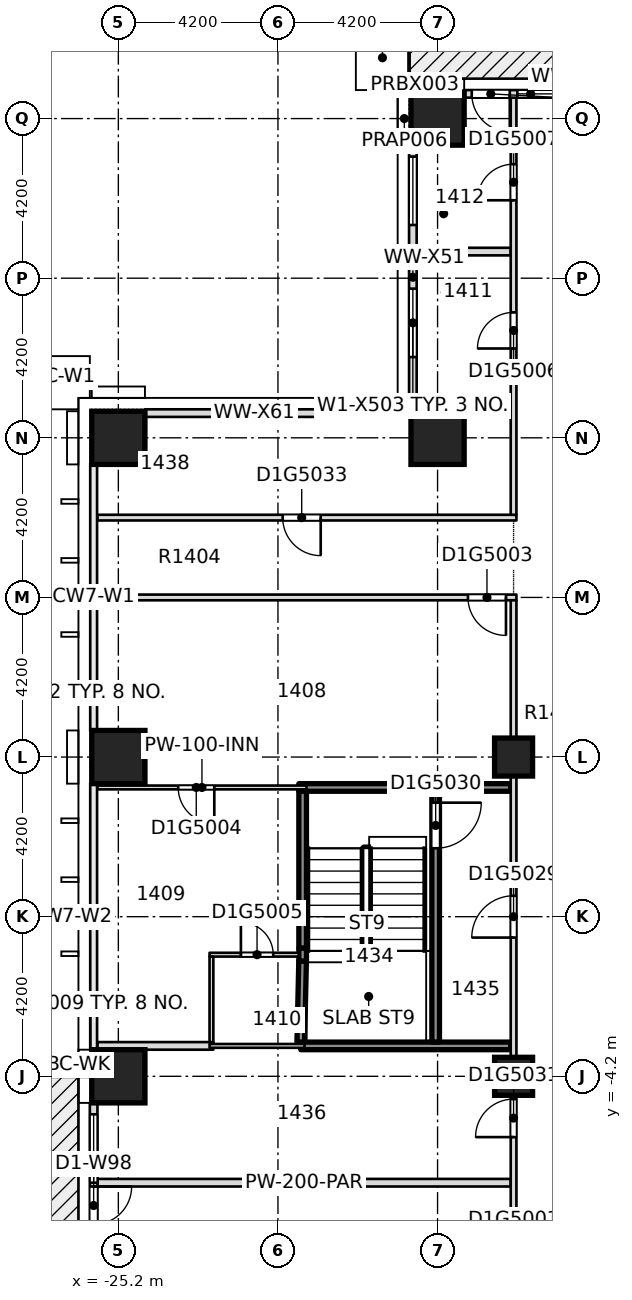
"""IFC4 building model, lengths in metres.
Left out: names, types, materials, properties, quantities, classifications, styles, units other than length and angle.
Written with IfcOpenShell. Run it as: python <this file> out.ifc"""

import sys

from ifc_helpers import new_model, si_unit, direction, frame, frame_2d, origin, origin_2d, place, context, subcontext, project, spatial, rectangle, extrude, element, fill, save


model = new_model("IFC4")
c1 = context("Model", 3, precision=1e-05, world=origin(), true_north=direction((0.0, 1.0)))
c2 = subcontext(c1, "Body", "Model", "MODEL_VIEW")
j1 = project(units=[si_unit("LENGTHUNIT", "METRE"), si_unit("PLANEANGLEUNIT", "RADIAN")], contexts=[c1])
p1 = place(None, origin())
s1 = spatial("IfcSite", under=j1, at=p1, CompositionType="ELEMENT")
p2 = place(p1, origin())
s2 = spatial("IfcBuilding", under=s1, at=p2, CompositionType="ELEMENT")
p3 = place(p2, frame((0.0, 0.0, 62.1)))
s3 = spatial("IfcBuildingStorey", under=s2, at=p3, CompositionType="ELEMENT", Elevation=62.1)
for number, where, z_axis, x_axis in (
    (1, (-25.2, -4.2, -0.32), (0.0, 0.0, 1.0), (1.0, 0.0, 0.0)),
    (2, (-25.2, 4.2, -0.32), (0.0, 0.0, 1.0), (1.0, 0.0, 0.0)),
    (3, (-25.2, 12.6, -0.32), (0.0, 0.0, 1.0), (1.0, 0.0, 0.0)),
    (4, (-16.8, 12.6, -0.32), (0.0, 0.0, 1.0), (1.0, 0.0, 0.0)),
    (5, (-16.8, 21.0, -0.32), (0.0, 0.0, 1.0), (1.0, 0.0, 0.0)),
):
    element("IfcColumn", number, at=place(p3, frame(where, z_axis=z_axis, x_axis=x_axis)), inside=s3, PredefinedType="COLUMN", context=c2, shape_type="SweptSolid", body=[
        extrude(rectangle(XDim=1.4, YDim=1.4, at=origin_2d()), origin(), (0.0, 0.0, 1.0), 3.45),
    ])
for number, where, z_axis, x_axis in (
    (6, (-14.8, -4.2, -0.32), (0.0, 0.0, 1.0), (1.0, 0.0, 0.0)),
    (7, (-14.8, 4.2, -0.32), (0.0, 0.0, 1.0), (1.0, 0.0, 0.0)),
):
    element("IfcColumn", number, at=place(p3, frame(where, z_axis=z_axis, x_axis=x_axis)), inside=s3, PredefinedType="COLUMN", context=c2, shape_type="SweptSolid", body=[
        extrude(rectangle(XDim=1.0, YDim=1.0, at=origin_2d()), origin(), (0.0, 0.0, 1.0), 3.45),
    ])
p4 = place(p3, frame((-25.75, -7.0, 0.0), z_axis=(0.0, 0.0, 1.0), x_axis=(1.0, 0.0, 0.0)))
e8 = element("IfcWall", 8, at=p4, inside=s3, PredefinedType="PARTITIONING", context=c2, shape_type="SweptSolid", body=[
    extrude(rectangle(XDim=10.875, YDim=0.2, at=frame_2d((5.438, 0.0))), origin(), (0.0, 0.0, 1.0), 3.13),
])
p5 = place(p3, frame((-25.75, -3.4, 0.0), z_axis=(0.0, 0.0, 1.0), x_axis=(1.0, 0.0, 0.0)))
e9 = element("IfcWall", 9, at=p5, inside=s3, PredefinedType="PARTITIONING", context=c2, shape_type="SweptSolid", body=[
    extrude(rectangle(XDim=3.05, YDim=0.2, at=frame_2d((1.525, 0.0))), origin(), (0.0, 0.0, 1.0), 3.13),
])
p6 = place(p3, frame((-22.8, -3.4, 0.0), z_axis=(0.0, 0.0, 1.0), x_axis=(1.0, 0.0, 0.0)))
e10 = element("IfcWall", 10, at=p6, inside=s3, PredefinedType="PARTITIONING", context=c2, shape_type="SweptSolid", body=[
    extrude(rectangle(XDim=2.5, YDim=0.1, at=frame_2d((1.25, 0.0))), origin(), (0.0, 0.0, 1.0), 3.13),
])
p7 = place(p3, frame((-20.4, -3.4, 0.0), z_axis=(0.0, 0.0, 1.0), x_axis=(1.0, 0.0, 0.0)))
e11 = element("IfcWall", 11, at=p7, inside=s3, PredefinedType="SOLIDWALL", context=c2, shape_type="SweptSolid", body=[
    extrude(rectangle(XDim=5.525, YDim=0.2, at=frame_2d((2.762, 0.0))), origin(), (0.0, 0.0, 1.0), 3.13),
])
p8 = place(p3, frame((-22.8, -1.0, 0.0), z_axis=(0.0, 0.0, 1.0), x_axis=(1.0, 0.0, 0.0)))
e12 = element("IfcWall", 12, at=p8, inside=s3, PredefinedType="PARTITIONING", context=c2, shape_type="SweptSolid", body=[
    extrude(rectangle(XDim=2.35, YDim=0.1, at=frame_2d((1.175, 0.0))), origin(), (0.0, 0.0, 1.0), 3.13),
])
p9 = place(p8, frame((0.825, 0.0, 0.0)))
e13 = element("IfcOpeningElement", 13, at=p9, cuts=e12, PredefinedType="OPENING", context=c2, shape_type="SweptSolid", body=[
    extrude(rectangle(XDim=0.85, YDim=2.1, at=frame_2d((0.425, 1.05))), frame((0.0, 0.06, 0.0), z_axis=(0.0, -1.0, 0.0), x_axis=(1.0, 0.0, 0.0)), (0.0, 0.0, 1.0), 0.12),
])
p10 = place(p3, frame((-25.75, 3.4, 0.0), z_axis=(0.0, 0.0, 1.0), x_axis=(1.0, 0.0, 0.0)))
e14 = element("IfcWall", 14, at=p10, inside=s3, PredefinedType="PARTITIONING", context=c2, shape_type="SweptSolid", body=[
    extrude(rectangle(XDim=5.5, YDim=0.1, at=frame_2d((2.75, 0.0))), origin(), (0.0, 0.0, 1.0), 3.13),
])
p11 = place(p10, frame((2.125, 0.0, 0.0)))
e15 = element("IfcOpeningElement", 15, at=p11, cuts=e14, PredefinedType="OPENING", context=c2, shape_type="SweptSolid", body=[
    extrude(rectangle(XDim=0.95, YDim=2.1, at=frame_2d((0.475, 1.05))), frame((0.0, 0.06, 0.0), z_axis=(0.0, -1.0, 0.0), x_axis=(1.0, 0.0, 0.0)), (0.0, 0.0, 1.0), 0.12),
])
p12 = place(p3, frame((-20.45, 3.4, 0.0), z_axis=(0.0, 0.0, 1.0), x_axis=(1.0, 0.0, 0.0)))
e16 = element("IfcWall", 16, at=p12, inside=s3, PredefinedType="SOLIDWALL", context=c2, shape_type="SweptSolid", body=[
    extrude(rectangle(XDim=5.575, YDim=0.2, at=frame_2d((2.788, 0.0))), origin(), (0.0, 0.0, 1.0), 3.13),
])
p13 = place(p3, frame((-25.75, 8.4, 0.0), z_axis=(0.0, 0.0, 1.0), x_axis=(1.0, 0.0, 0.0)))
e17 = element("IfcWall", 17, at=p13, inside=s3, PredefinedType="PARTITIONING", context=c2, shape_type="SweptSolid", body=[
    extrude(rectangle(XDim=11.025, YDim=0.15, at=frame_2d((5.512, 0.0))), origin(), (0.0, 0.0, 1.0), 3.13),
])
p14 = place(p13, frame((9.75, 0.0, 0.0)))
e18 = element("IfcOpeningElement", 18, at=p14, cuts=e17, PredefinedType="OPENING", context=c2, shape_type="SweptSolid", body=[
    extrude(rectangle(XDim=1.0, YDim=2.1, at=frame_2d((0.5, 1.05))), frame((0.0, 0.085, 0.0), z_axis=(0.0, -1.0, 0.0), x_axis=(1.0, 0.0, 0.0)), (0.0, 0.0, 1.0), 0.17),
])
p15 = place(p3, frame((-25.75, 10.5, 0.0), z_axis=(0.0, 0.0, 1.0), x_axis=(1.0, 0.0, 0.0)))
e19 = element("IfcWall", 19, at=p15, inside=s3, PredefinedType="PARTITIONING", context=c2, shape_type="SweptSolid", body=[
    extrude(rectangle(XDim=11.025, YDim=0.15, at=frame_2d((5.512, 0.0))), origin(), (0.0, 0.0, 1.0), 3.13),
])
p16 = place(p15, frame((4.875, 0.0, 0.0)))
e20 = element("IfcOpeningElement", 20, at=p16, cuts=e19, PredefinedType="OPENING", context=c2, shape_type="SweptSolid", body=[
    extrude(rectangle(XDim=1.0, YDim=2.1, at=frame_2d((0.5, 1.05))), frame((0.0, 0.085, 0.0), z_axis=(0.0, -1.0, 0.0), x_axis=(1.0, 0.0, 0.0)), (0.0, 0.0, 1.0), 0.17),
])
for number, where, z_axis, x_axis in (
    (21, (-17.35, 13.35, 0.0), (0.0, 0.0, 1.0), (1.0, 0.0, 0.0)),
    (22, (-17.35, 17.5, 0.0), (0.0, 0.0, 1.0), (1.0, 0.0, 0.0)),
):
    element("IfcWall", number, at=place(p3, frame(where, z_axis=z_axis, x_axis=x_axis)), inside=s3, PredefinedType="PARTITIONING", context=c2, shape_type="SweptSolid", body=[
        extrude(rectangle(XDim=2.475, YDim=0.2, at=frame_2d((1.238, 0.0))), origin(), (0.0, 0.0, 1.0), 3.13),
    ])
p17 = place(p3, frame((-22.75, -3.3, 0.0), z_axis=(0.0, 0.0, 1.0), x_axis=(0.0, 1.0, 0.0)))
e23 = element("IfcWall", 23, at=p17, inside=s3, PredefinedType="PARTITIONING", context=c2, shape_type="SweptSolid", body=[
    extrude(rectangle(XDim=2.25, YDim=0.1, at=frame_2d((1.125, 0.0))), origin(), (0.0, 0.0, 1.0), 3.13),
])
p18 = place(p3, frame((-20.4, -3.3, 0.0), z_axis=(0.0, 0.0, 1.0), x_axis=(0.022687568549, 0.99974260399, 0.0)))
e24 = element("IfcWall", 24, at=p18, inside=s3, PredefinedType="SOLIDWALL", context=c2, shape_type="SweptSolid", body=[
    extrude(rectangle(XDim=2.131, YDim=0.2, at=frame_2d((1.065, 0.0))), origin(), (0.0, 0.0, 1.0), 3.13),
])
p19 = place(p3, frame((-20.35, -0.83, 0.0), z_axis=(0.0, 0.0, 1.0), x_axis=(0.0, 1.0, 0.0)))
e25 = element("IfcWall", 25, at=p19, inside=s3, PredefinedType="SOLIDWALL", context=c2, shape_type="SweptSolid", body=[
    extrude(rectangle(XDim=4.13, YDim=0.2, at=frame_2d((2.065, 0.0))), origin(), (0.0, 0.0, 1.0), 3.13),
])
p20 = place(p3, frame((-16.85, -3.3, 0.0), z_axis=(0.0, 0.0, 1.0), x_axis=(0.0, 1.0, 0.0)))
e26 = element("IfcWall", 26, at=p20, inside=s3, PredefinedType="SOLIDWALL", context=c2, shape_type="SweptSolid", body=[
    extrude(rectangle(XDim=6.6, YDim=0.2, at=frame_2d((3.3, 0.0))), origin(), (0.0, 0.0, 1.0), 3.13),
])
p21 = place(p20, frame((5.1, 0.0, 0.0)))
e27 = element("IfcOpeningElement", 27, at=p21, cuts=e26, PredefinedType="OPENING", context=c2, shape_type="SweptSolid", body=[
    extrude(rectangle(XDim=1.2, YDim=2.1, at=frame_2d((0.6, 1.05))), frame((0.0, 0.11, 0.0), z_axis=(0.0, -1.0, 0.0), x_axis=(1.0, 0.0, 0.0)), (0.0, 0.0, 1.0), 0.22),
])
p22 = place(p3, frame((-14.8, -9.85, 0.0), z_axis=(0.0, 0.0, 1.0), x_axis=(0.0, 1.0, 0.0)))
e28 = element("IfcWall", 28, at=p22, inside=s3, PredefinedType="PARTITIONING", context=c2, shape_type="SweptSolid", body=[
    extrude(rectangle(XDim=18.175, YDim=0.15, at=frame_2d((9.087, 0.0))), origin(), (0.0, 0.0, 1.0), 3.13),
])
p23 = place(p22, frame((0.3, 0.0, 0.0)))
e29 = element("IfcOpeningElement", 29, at=p23, cuts=e28, PredefinedType="OPENING", context=c2, shape_type="SweptSolid", body=[
    extrude(rectangle(XDim=0.95, YDim=2.1, at=frame_2d((0.475, 1.05))), frame((0.0, 0.085, 0.0), z_axis=(0.0, -1.0, 0.0), x_axis=(1.0, 0.0, 0.0)), (0.0, 0.0, 1.0), 0.17),
])
p24 = place(p22, frame((9.3, 0.0, 0.0)))
e30 = element("IfcOpeningElement", 30, at=p24, cuts=e28, PredefinedType="OPENING", context=c2, shape_type="SweptSolid", body=[
    extrude(rectangle(XDim=1.1, YDim=2.1, at=frame_2d((0.55, 1.05))), frame((0.0, 0.085, 0.0), z_axis=(0.0, -1.0, 0.0), x_axis=(1.0, 0.0, 0.0)), (0.0, 0.0, 1.0), 0.17),
])
p25 = place(p22, frame((4.05, 0.0, 0.0)))
e31 = element("IfcOpeningElement", 31, at=p25, cuts=e28, PredefinedType="OPENING", context=c2, shape_type="SweptSolid", body=[
    extrude(rectangle(XDim=1.0, YDim=2.1, at=frame_2d((0.5, 1.05))), frame((0.0, 0.085, 0.0), z_axis=(0.0, -1.0, 0.0), x_axis=(1.0, 0.0, 0.0)), (0.0, 0.0, 1.0), 0.17),
])
p26 = place(p3, frame((-14.8, 10.575, 0.0), z_axis=(0.0, 0.0, 1.0), x_axis=(0.0, 1.0, 0.0)))
e32 = element("IfcWall", 32, at=p26, inside=s3, PredefinedType="PARTITIONING", context=c2, shape_type="SweptSolid", body=[
    extrude(rectangle(XDim=10.975, YDim=0.15, at=frame_2d((5.488, 0.0))), origin(), (0.0, 0.0, 1.0), 3.13),
])
p27 = place(p26, frame((4.375, 0.0, 0.0)))
e33 = element("IfcOpeningElement", 33, at=p27, cuts=e32, PredefinedType="OPENING", context=c2, shape_type="SweptSolid", body=[
    extrude(rectangle(XDim=0.95, YDim=2.1, at=frame_2d((0.475, 1.05))), frame((0.0, 0.085, 0.0), z_axis=(0.0, -1.0, 0.0), x_axis=(1.0, 0.0, 0.0)), (0.0, 0.0, 1.0), 0.17),
])
p28 = place(p26, frame((8.275, 0.0, 0.0)))
e34 = element("IfcOpeningElement", 34, at=p28, cuts=e32, PredefinedType="OPENING", context=c2, shape_type="SweptSolid", body=[
    extrude(rectangle(XDim=0.95, YDim=2.1, at=frame_2d((0.475, 1.05))), frame((0.0, 0.085, 0.0), z_axis=(0.0, -1.0, 0.0), x_axis=(1.0, 0.0, 0.0)), (0.0, 0.0, 1.0), 0.17),
])
p29 = place(p3, frame((-12.6, 21.65, 0.0), z_axis=(0.0, 0.0, 1.0), x_axis=(-1.0, 0.0, 0.0)))
e35 = element("IfcWall", 35, at=p29, inside=s3, PredefinedType="STANDARD", context=c2, shape_type="SweptSolid", body=[
    extrude(rectangle(XDim=3.5, YDim=0.2, at=frame_2d((1.75, 0.0))), origin(), (0.0, 0.0, 1.0), 3.13),
])
p30 = place(p29, frame((0.3, 0.0, 0.2)))
e36 = element("IfcOpeningElement", 36, at=p30, cuts=e35, PredefinedType="OPENING", context=c2, shape_type="SweptSolid", body=[
    extrude(rectangle(XDim=1.8, YDim=2.65, at=frame_2d((0.9, 1.325))), frame((0.0, 0.11, 0.0), z_axis=(0.0, -1.0, 0.0), x_axis=(1.0, 0.0, 0.0)), (0.0, 0.0, 1.0), 0.22),
])
p31 = place(p29, frame((2.3, 0.0, 0.0)))
e37 = element("IfcOpeningElement", 37, at=p31, cuts=e35, PredefinedType="OPENING", context=c2, shape_type="SweptSolid", body=[
    extrude(rectangle(XDim=1.0, YDim=2.4, at=frame_2d((0.5, 1.2))), frame((0.0, 0.11, 0.0), z_axis=(0.0, -1.0, 0.0), x_axis=(1.0, 0.0, 0.0)), (0.0, 0.0, 1.0), 0.22),
])
p32 = place(p3, frame((-17.45, 20.3, 0.0), z_axis=(0.0, 0.0, 1.0), x_axis=(0.0, -1.0, 0.0)))
e38 = element("IfcWall", 38, at=p32, inside=s3, PredefinedType="STANDARD", context=c2, shape_type="SweptSolid", body=[
    extrude(rectangle(XDim=6.95, YDim=0.2, at=frame_2d((3.475, 0.0))), origin(), (0.0, 0.0, 1.0), 3.13),
])
p33 = place(p32, frame((3.775, 0.0, 0.2)))
e39 = element("IfcOpeningElement", 39, at=p33, cuts=e38, PredefinedType="OPENING", context=c2, shape_type="SweptSolid", body=[
    extrude(rectangle(XDim=1.8, YDim=2.65, at=frame_2d((0.9, 1.325))), frame((0.0, 0.11, 0.0), z_axis=(0.0, -1.0, 0.0), x_axis=(1.0, 0.0, 0.0)), (0.0, 0.0, 1.0), 0.22),
])
p34 = place(p32, frame((0.3, 0.0, 0.2)))
e40 = element("IfcOpeningElement", 40, at=p34, cuts=e38, PredefinedType="OPENING", context=c2, shape_type="SweptSolid", body=[
    extrude(rectangle(XDim=1.8, YDim=2.65, at=frame_2d((0.9, 1.325))), frame((0.0, 0.11, 0.0), z_axis=(0.0, -1.0, 0.0), x_axis=(1.0, 0.0, 0.0)), (0.0, 0.0, 1.0), 0.22),
])
p35 = place(p3, frame((-17.55, 13.25, 0.0), z_axis=(0.0, 0.0, 1.0), x_axis=(-1.0, 0.0, 0.0)))
e41 = element("IfcWall", 41, at=p35, inside=s3, PredefinedType="STANDARD", context=c2, shape_type="SweptSolid", body=[
    extrude(rectangle(XDim=6.95, YDim=0.2, at=frame_2d((3.475, 0.0))), origin(), (0.0, 0.0, 1.0), 3.13),
])
p36 = place(p3, frame((-25.85, -4.9, 0.0), z_axis=(0.0, 0.0, 1.0), x_axis=(0.0, -1.0, 0.0)))
e42 = element("IfcWall", 42, at=p36, inside=s3, PredefinedType="STANDARD", context=c2, shape_type="SweptSolid", body=[
    extrude(rectangle(XDim=7.0, YDim=0.2, at=frame_2d((3.5, 0.0))), origin(), (0.0, 0.0, 1.0), 3.13),
])
p37 = place(p36, frame((3.8, 0.0, 0.2)))
e43 = element("IfcOpeningElement", 43, at=p37, cuts=e42, PredefinedType="OPENING", context=c2, shape_type="SweptSolid", body=[
    extrude(rectangle(XDim=1.8, YDim=2.65, at=frame_2d((0.9, 1.325))), frame((0.0, 0.11, 0.0), z_axis=(0.0, -1.0, 0.0), x_axis=(1.0, 0.0, 0.0)), (0.0, 0.0, 1.0), 0.22),
])
p38 = place(p36, frame((5.7, 0.0, 0.0)))
e44 = element("IfcOpeningElement", 44, at=p38, cuts=e42, PredefinedType="OPENING", context=c2, shape_type="SweptSolid", body=[
    extrude(rectangle(XDim=1.0, YDim=2.4, at=frame_2d((0.5, 1.2))), frame((0.0, 0.11, 0.0), z_axis=(0.0, -1.0, 0.0), x_axis=(1.0, 0.0, 0.0)), (0.0, 0.0, 1.0), 0.22),
])
p39 = place(p36, frame((0.3, 0.0, 0.2)))
e45 = element("IfcOpeningElement", 45, at=p39, cuts=e42, PredefinedType="OPENING", context=c2, shape_type="SweptSolid", body=[
    extrude(rectangle(XDim=1.8, YDim=2.65, at=frame_2d((0.9, 1.325))), frame((0.0, 0.11, 0.0), z_axis=(0.0, -1.0, 0.0), x_axis=(1.0, 0.0, 0.0)), (0.0, 0.0, 1.0), 0.22),
])
p40 = place(p36, frame((2.2, 0.0, 0.0)))
e46 = element("IfcOpeningElement", 46, at=p40, cuts=e42, PredefinedType="OPENING", context=c2, shape_type="SweptSolid", body=[
    extrude(rectangle(XDim=1.0, YDim=2.4, at=frame_2d((0.5, 1.2))), frame((0.0, 0.11, 0.0), z_axis=(0.0, -1.0, 0.0), x_axis=(1.0, 0.0, 0.0)), (0.0, 0.0, 1.0), 0.22),
])
p41 = place(p3, frame((-20.35, -1.17, 0.0), z_axis=(0.0, 0.0, 1.0), x_axis=(0.0, 1.0, 0.0)))
e47 = element("IfcWall", 47, at=p41, inside=s3, PredefinedType="SOLIDWALL", context=c2, shape_type="SweptSolid", body=[
    extrude(rectangle(XDim=0.34, YDim=0.2, at=frame_2d((0.17, 0.0))), origin(), (0.0, 0.0, 1.0), 3.13),
])
p42 = place(p14, origin())
e48 = element("IfcDoor", 48, at=p42, inside=s3, OperationType="SINGLE_SWING_RIGHT", PredefinedType="DOOR", context=c2, shape_type="SweptSolid", body=[
    extrude(rectangle(XDim=1.0, YDim=2.1, at=frame_2d((0.5, 1.05))), frame((0.0, 0.025, 0.0), z_axis=(0.0, -1.0, 0.0), x_axis=(1.0, 0.0, 0.0)), (0.0, 0.0, 1.0), 0.05),
])
fill(e18, e48)
p43 = place(p11, origin())
e49 = element("IfcDoor", 49, at=p43, inside=s3, OperationType="SINGLE_SWING_LEFT", PredefinedType="DOOR", context=c2, shape_type="SweptSolid", body=[
    extrude(rectangle(XDim=0.95, YDim=2.1, at=frame_2d((0.475, 1.05))), frame((0.0, 0.025, 0.0), z_axis=(0.0, -1.0, 0.0), x_axis=(1.0, 0.0, 0.0)), (0.0, 0.0, 1.0), 0.05),
])
fill(e15, e49)
p44 = place(p9, origin())
e50 = element("IfcDoor", 50, at=p44, inside=s3, OperationType="SINGLE_SWING_RIGHT", PredefinedType="DOOR", context=c2, shape_type="SweptSolid", body=[
    extrude(rectangle(XDim=0.85, YDim=2.1, at=frame_2d((0.425, 1.05))), frame((0.0, 0.025, 0.0), z_axis=(0.0, -1.0, 0.0), x_axis=(1.0, 0.0, 0.0)), (0.0, 0.0, 1.0), 0.05),
])
fill(e13, e50)
p45 = place(p27, origin())
e51 = element("IfcDoor", 51, at=p45, inside=s3, OperationType="SINGLE_SWING_LEFT", PredefinedType="DOOR", context=c2, shape_type="SweptSolid", body=[
    extrude(rectangle(XDim=0.95, YDim=2.1, at=frame_2d((0.475, 1.05))), frame((0.0, 0.025, 0.0), z_axis=(0.0, -1.0, 0.0), x_axis=(1.0, 0.0, 0.0)), (0.0, 0.0, 1.0), 0.05),
])
fill(e33, e51)
p46 = place(p28, origin())
e52 = element("IfcDoor", 52, at=p46, inside=s3, OperationType="SINGLE_SWING_RIGHT", PredefinedType="DOOR", context=c2, shape_type="SweptSolid", body=[
    extrude(rectangle(XDim=0.95, YDim=2.1, at=frame_2d((0.475, 1.05))), frame((0.0, 0.025, 0.0), z_axis=(0.0, -1.0, 0.0), x_axis=(1.0, 0.0, 0.0)), (0.0, 0.0, 1.0), 0.05),
])
fill(e34, e52)
p47 = place(p24, origin())
e53 = element("IfcDoor", 53, at=p47, inside=s3, OperationType="SINGLE_SWING_RIGHT", PredefinedType="DOOR", context=c2, shape_type="SweptSolid", body=[
    extrude(rectangle(XDim=1.1, YDim=2.1, at=frame_2d((0.55, 1.05))), frame((0.0, 0.025, 0.0), z_axis=(0.0, -1.0, 0.0), x_axis=(1.0, 0.0, 0.0)), (0.0, 0.0, 1.0), 0.05),
])
fill(e30, e53)
p48 = place(p21, origin())
e54 = element("IfcDoor", 54, at=p48, inside=s3, OperationType="SINGLE_SWING_RIGHT", PredefinedType="DOOR", context=c2, shape_type="SweptSolid", body=[
    extrude(rectangle(XDim=1.2, YDim=2.1, at=frame_2d((0.6, 1.05))), frame((0.0, 0.025, 0.0), z_axis=(0.0, -1.0, 0.0), x_axis=(1.0, 0.0, 0.0)), (0.0, 0.0, 1.0), 0.05),
])
fill(e27, e54)
p49 = place(p25, origin())
e55 = element("IfcDoor", 55, at=p49, inside=s3, OperationType="SINGLE_SWING_LEFT", PredefinedType="DOOR", context=c2, shape_type="SweptSolid", body=[
    extrude(rectangle(XDim=1.0, YDim=2.1, at=frame_2d((0.5, 1.05))), frame((0.0, 0.025, 0.0), z_axis=(0.0, -1.0, 0.0), x_axis=(1.0, 0.0, 0.0)), (0.0, 0.0, 1.0), 0.05),
])
fill(e31, e55)
p50 = place(p16, origin())
e56 = element("IfcDoor", 56, at=p50, inside=s3, OperationType="SINGLE_SWING_RIGHT", PredefinedType="DOOR", context=c2, shape_type="SweptSolid", body=[
    extrude(rectangle(XDim=1.0, YDim=2.1, at=frame_2d((0.5, 1.05))), frame((0.0, 0.025, 0.0), z_axis=(0.0, -1.0, 0.0), x_axis=(1.0, 0.0, 0.0)), (0.0, 0.0, 1.0), 0.05),
])
fill(e20, e56)
p51 = place(p30, origin())
e57 = element("IfcWindow", 57, at=p51, inside=s3, PartitioningType="SINGLE_PANEL", PredefinedType="WINDOW", context=c2, shape_type="SweptSolid", body=[
    extrude(rectangle(XDim=1.8, YDim=2.65, at=frame_2d((0.9, 1.325))), frame((0.0, 0.03, 0.0), z_axis=(0.0, -1.0, 0.0), x_axis=(1.0, 0.0, 0.0)), (0.0, 0.0, 1.0), 0.06),
])
fill(e36, e57)
p52 = place(p31, origin())
e58 = element("IfcDoor", 58, at=p52, inside=s3, OperationType="SINGLE_SWING_LEFT", PredefinedType="DOOR", context=c2, shape_type="SweptSolid", body=[
    extrude(rectangle(XDim=1.0, YDim=2.4, at=frame_2d((0.5, 1.2))), frame((0.0, 0.025, 0.0), z_axis=(0.0, -1.0, 0.0), x_axis=(1.0, 0.0, 0.0)), (0.0, 0.0, 1.0), 0.05),
])
fill(e37, e58)
p53 = place(p33, origin())
e59 = element("IfcWindow", 59, at=p53, inside=s3, PartitioningType="SINGLE_PANEL", PredefinedType="WINDOW", context=c2, shape_type="SweptSolid", body=[
    extrude(rectangle(XDim=1.8, YDim=2.65, at=frame_2d((0.9, 1.325))), frame((0.0, 0.03, 0.0), z_axis=(0.0, -1.0, 0.0), x_axis=(1.0, 0.0, 0.0)), (0.0, 0.0, 1.0), 0.06),
])
fill(e39, e59)
p54 = place(p34, origin())
e60 = element("IfcWindow", 60, at=p54, inside=s3, PartitioningType="SINGLE_PANEL", PredefinedType="WINDOW", context=c2, shape_type="SweptSolid", body=[
    extrude(rectangle(XDim=1.8, YDim=2.65, at=frame_2d((0.9, 1.325))), frame((0.0, 0.03, 0.0), z_axis=(0.0, -1.0, 0.0), x_axis=(1.0, 0.0, 0.0)), (0.0, 0.0, 1.0), 0.06),
])
fill(e40, e60)
p55 = place(p39, origin())
e61 = element("IfcWindow", 61, at=p55, inside=s3, PartitioningType="SINGLE_PANEL", PredefinedType="WINDOW", context=c2, shape_type="SweptSolid", body=[
    extrude(rectangle(XDim=1.8, YDim=2.65, at=frame_2d((0.9, 1.325))), frame((0.0, 0.03, 0.0), z_axis=(0.0, -1.0, 0.0), x_axis=(1.0, 0.0, 0.0)), (0.0, 0.0, 1.0), 0.06),
])
fill(e45, e61)
p56 = place(p40, origin())
e62 = element("IfcDoor", 62, at=p56, inside=s3, OperationType="SINGLE_SWING_LEFT", PredefinedType="DOOR", context=c2, shape_type="SweptSolid", body=[
    extrude(rectangle(XDim=1.0, YDim=2.4, at=frame_2d((0.5, 1.2))), frame((0.0, 0.025, 0.0), z_axis=(0.0, -1.0, 0.0), x_axis=(1.0, 0.0, 0.0)), (0.0, 0.0, 1.0), 0.05),
])
fill(e46, e62)
save(model, sys.argv[1])
